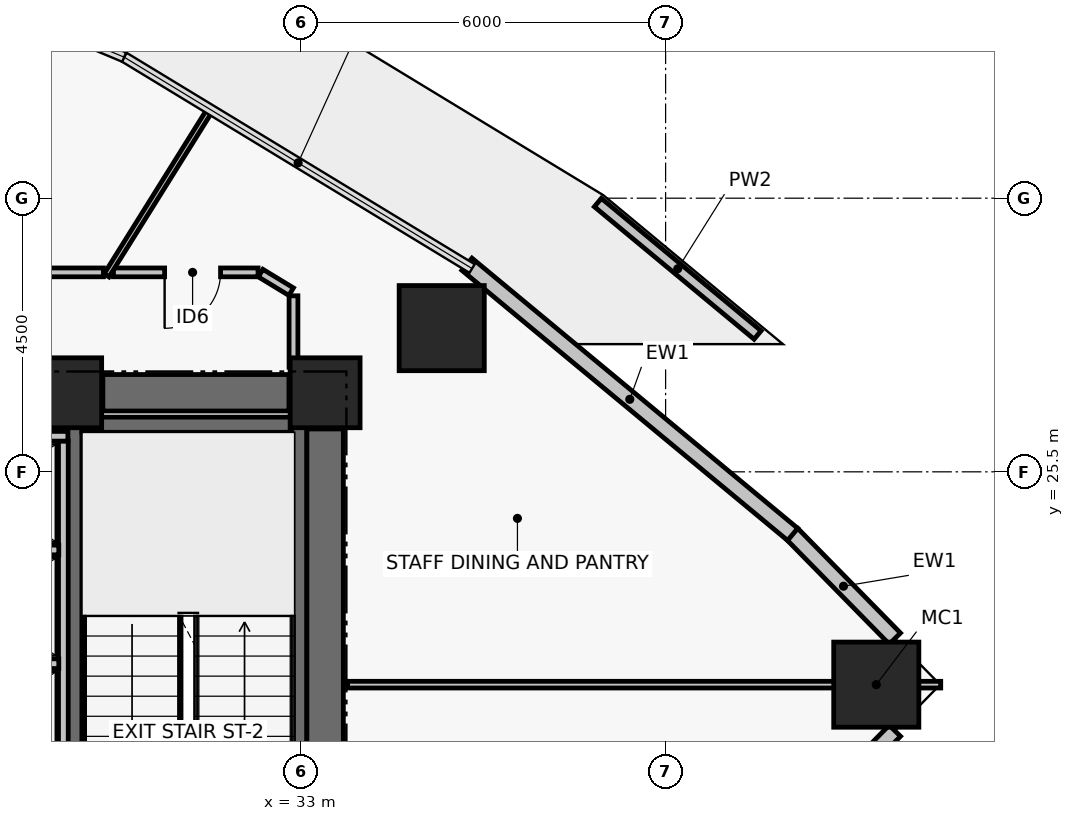
"""IFC4 building model, lengths in metres.
Left out: names, types, materials, properties, quantities, classifications, styles, units other than length and angle.
Written with IfcOpenShell. Run it as: python <this file> out.ifc"""

import sys

from ifc_helpers import new_model, si_unit, direction, frame, frame_2d, origin, origin_2d, place, context, subcontext, project, spatial, rectangle, hollow_rectangle, extrude, element, fill, save


model = new_model("IFC4")
c1 = context("Model", 3, precision=1e-05, world=origin(), true_north=direction((0.0, 1.0)))
c2 = subcontext(c1, "Body", "Model", "MODEL_VIEW")
j1 = project(units=[si_unit("LENGTHUNIT", "METRE"), si_unit("PLANEANGLEUNIT", "RADIAN")], contexts=[c1])
p1 = place(None, origin())
s1 = spatial("IfcSite", under=j1, at=p1, CompositionType="ELEMENT")
p2 = place(p1, origin())
s2 = spatial("IfcBuilding", under=s1, at=p2, CompositionType="ELEMENT")
p3 = place(p2, frame((0.0, 0.0, 27.6)))
s3 = spatial("IfcBuildingStorey", under=s2, at=p3, CompositionType="ELEMENT", Elevation=27.6)
for number, where, z_axis, x_axis in (
    (1, (29.15, 26.8, 0.0), (0.0, 0.0, 1.0), (1.0, 0.0, 0.0)),
    (2, (33.4, 26.8, 0.0), (0.0, 0.0, 1.0), (1.0, 0.0, 0.0)),
):
    element("IfcColumn", number, at=place(p3, frame(where, z_axis=z_axis, x_axis=x_axis)), inside=s3, PredefinedType="COLUMN", context=c2, shape_type="SweptSolid", body=[
        extrude(rectangle(XDim=1.15, YDim=1.15, at=origin_2d()), origin(), (0.0, 0.0, 1.0), 3.72),
    ])
p4 = place(p3, frame((29.745, 26.8, 0.0), z_axis=(0.0, 0.0, 1.0), x_axis=(1.0, 0.0, 0.0)))
e3 = element("IfcWall", 3, at=p4, inside=s3, PredefinedType="SHEAR", context=c2, shape_type="SweptSolid", body=[
    extrude(rectangle(XDim=3.06, YDim=0.6, at=frame_2d((1.53, 0.0))), origin(), (0.0, 0.0, 1.0), 3.47),
])
p5 = place(p3, frame((33.4, 17.795, 0.0), z_axis=(0.0, 0.0, 1.0), x_axis=(0.0, 1.0, 0.0)))
e4 = element("IfcWall", 4, at=p5, inside=s3, PredefinedType="SHEAR", context=c2, shape_type="SweptSolid", body=[
    extrude(rectangle(XDim=8.41, YDim=0.6, at=frame_2d((4.205, 0.0))), origin(), (0.0, 0.0, 1.0), 3.47),
])
p6 = place(p3, frame((29.275, 17.6, 0.0), z_axis=(0.0, 0.0, 1.0), x_axis=(0.0, 1.0, 0.0)))
e5 = element("IfcWall", 5, at=p6, inside=s3, PredefinedType="SHEAR", context=c2, shape_type="SweptSolid", body=[
    extrude(rectangle(XDim=8.8, YDim=0.25, at=frame_2d((4.4, 0.0))), origin(), (0.0, 0.0, 1.0), 3.47),
])
p7 = place(p6, frame((0.35, 0.0, 0.0)))
e6 = element("IfcOpeningElement", 6, at=p7, cuts=e5, PredefinedType="OPENING", context=c2, shape_type="SweptSolid", body=[
    extrude(rectangle(XDim=1.05, YDim=2.08, at=frame_2d((0.525, 1.04))), frame((0.0, 0.135, 0.0), z_axis=(0.0, -1.0, 0.0), x_axis=(1.0, 0.0, 0.0)), (0.0, 0.0, 1.0), 0.27),
])
p8 = place(p3, frame((32.971, 17.6, 0.0), z_axis=(0.0, 0.0, 1.0), x_axis=(0.0, 1.0, 0.0)))
e7 = element("IfcWall", 7, at=p8, inside=s3, PredefinedType="SHEAR", context=c2, shape_type="SweptSolid", body=[
    extrude(rectangle(XDim=8.8, YDim=0.25, at=frame_2d((4.4, 0.0))), origin(), (0.0, 0.0, 1.0), 3.47),
])
p9 = place(p3, frame((29.4, 26.275, 0.0), z_axis=(0.0, 0.0, 1.0), x_axis=(1.0, 0.0, 0.0)))
e8 = element("IfcWall", 8, at=p9, inside=s3, PredefinedType="SHEAR", context=c2, shape_type="SweptSolid", body=[
    extrude(rectangle(XDim=3.446, YDim=0.25, at=frame_2d((1.723, 0.0))), origin(), (0.0, 0.0, 1.0), 3.47),
])
for number, where, z_axis, x_axis in (
    (9, (42.465, 22.0, 0.0), (0.0, 0.0, 1.0), (1.0, 0.0, 0.0)),
    (10, (35.318, 27.863, 0.0), (0.0, 0.0, 1.0), (1.0, 0.0, 0.0)),
):
    element("IfcColumn", number, at=place(p3, frame(where, z_axis=z_axis, x_axis=x_axis)), inside=s3, PredefinedType="COLUMN", context=c2, shape_type="SweptSolid", body=[
        extrude(hollow_rectangle(XDim=1.4, YDim=1.4, WallThickness=0.055, at=origin_2d()), origin(), (0.0, 0.0, 1.0), 3.72),
    ])
for number, where, z_axis, x_axis in (
    (11, (42.77, 21.242, 0.0), (0.0, 0.0, 1.0), (-0.701, -0.714, 0.0)),
    (12, (41.081, 24.479, 0.0), (0.0, 0.0, 1.0), (0.701, -0.714, 0.0)),
):
    element("IfcWall", number, at=place(p3, frame(where, z_axis=z_axis, x_axis=x_axis)), inside=s3, PredefinedType="PARTITIONING", context=c2, shape_type="SweptSolid", body=[
        extrude(rectangle(XDim=2.412, YDim=0.26, at=frame_2d((1.206, 0.0))), origin(), (0.0, 0.0, 1.0), 3.47),
    ])
p10 = place(p3, frame((35.732, 28.914, 0.0), z_axis=(0.0, 0.0, 1.0), x_axis=(0.769754596928, -0.638339925517, 0.0)))
e13 = element("IfcWall", 13, at=p10, inside=s3, PredefinedType="PARTITIONING", context=c2, shape_type="SweptSolid", body=[
    extrude(rectangle(XDim=6.959, YDim=0.26, at=frame_2d((3.479, 0.0))), origin(), (0.0, 0.0, 1.0), 3.47),
])
p11 = place(p3, frame((37.886, 29.929, 0.0), z_axis=(0.0, 0.0, 1.0), x_axis=(0.769720237207, -0.638381356584, 0.0)))
e14 = element("IfcWall", 14, at=p11, inside=s3, PredefinedType="PARAPET", context=c2, shape_type="SweptSolid", body=[
    extrude(rectangle(XDim=3.413, YDim=0.18, at=frame_2d((1.707, 0.0))), origin(), (0.0, 0.0, 1.0), 1.15),
])
p12 = place(p3, frame((29.095, 20.56, 0.0), z_axis=(0.0, 0.0, 1.0), x_axis=(0.0, 1.0, 0.0)))
e15 = element("IfcWall", 15, at=p12, inside=s3, PredefinedType="PARTITIONING", context=c2, shape_type="SweptSolid", body=[
    extrude(rectangle(XDim=5.45, YDim=0.16, at=frame_2d((2.725, 0.0))), origin(), (0.0, 0.0, 1.0), 3.47),
])
p13 = place(p3, frame((26.37, 22.345, 0.0), z_axis=(0.0, 0.0, 1.0), x_axis=(1.0, 0.0, 0.0)))
e16 = element("IfcWall", 16, at=p13, inside=s3, PredefinedType="PARTITIONING", context=c2, shape_type="SweptSolid", body=[
    extrude(rectangle(XDim=2.65, YDim=0.16, at=frame_2d((1.325, 0.0))), origin(), (0.0, 0.0, 1.0), 3.47),
])
p14 = place(p3, frame((26.53, 24.215, 0.0), z_axis=(0.0, 0.0, 1.0), x_axis=(1.0, 0.0, 0.0)))
e17 = element("IfcWall", 17, at=p14, inside=s3, PredefinedType="PARTITIONING", context=c2, shape_type="SweptSolid", body=[
    extrude(rectangle(XDim=2.49, YDim=0.16, at=frame_2d((1.245, 0.0))), origin(), (0.0, 0.0, 1.0), 3.47),
])
p15 = place(p3, frame((26.34, 26.085, 0.0), z_axis=(0.0, 0.0, 1.0), x_axis=(1.0, 0.0, 0.0)))
e18 = element("IfcWall", 18, at=p15, inside=s3, PredefinedType="PARTITIONING", context=c2, shape_type="SweptSolid", body=[
    extrude(rectangle(XDim=2.83, YDim=0.16, at=frame_2d((1.415, 0.0))), origin(), (0.0, 0.0, 1.0), 3.47),
])
p16 = place(p3, frame((33.74, 27.22, 0.0), z_axis=(0.0, 0.0, 1.0), x_axis=(-1.0, 0.0, 0.0)))
e19 = element("IfcWall", 19, at=p16, inside=s3, PredefinedType="PARTITIONING", context=c2, shape_type="SweptSolid", body=[
    extrude(rectangle(XDim=0.86, YDim=0.145, at=frame_2d((0.43, 0.0))), origin(), (0.0, 0.0, 1.0), 2.6),
])
p17 = place(p3, frame((32.88, 27.22, 0.0), z_axis=(0.0, 0.0, 1.0), x_axis=(0.0, 1.0, 0.0)))
e20 = element("IfcWall", 20, at=p17, inside=s3, PredefinedType="PARTITIONING", context=c2, shape_type="SweptSolid", body=[
    extrude(rectangle(XDim=1.175, YDim=0.145, at=frame_2d((0.587, 0.0))), origin(), (0.0, 0.0, 1.0), 2.6),
])
p18 = place(p3, frame((32.842, 28.463, 0.0), z_axis=(0.0, 0.0, 1.0), x_axis=(-0.854807247113, 0.518945633264, 0.0)))
e21 = element("IfcWall", 21, at=p18, inside=s3, PredefinedType="PARTITIONING", context=c2, shape_type="SweptSolid", body=[
    extrude(rectangle(XDim=0.588, YDim=0.145, at=frame_2d((0.294, 0.0))), origin(), (0.0, 0.0, 1.0), 3.0),
])
p19 = place(p3, frame((32.297, 28.78, 0.0), z_axis=(0.0, 0.0, 1.0), x_axis=(-1.0, 0.0, 0.0)))
e22 = element("IfcWall", 22, at=p19, inside=s3, PredefinedType="PARTITIONING", context=c2, shape_type="SweptSolid", body=[
    extrude(rectangle(XDim=2.378, YDim=0.145, at=frame_2d((1.189, 0.0))), origin(), (0.0, 0.0, 1.0), 3.0),
])
p20 = place(p19, frame((0.617, 0.0, 0.0)))
e23 = element("IfcOpeningElement", 23, at=p20, cuts=e22, PredefinedType="OPENING", context=c2, shape_type="SweptSolid", body=[
    extrude(rectangle(XDim=0.92, YDim=2.05, at=frame_2d((0.46, 1.025))), frame((0.0, 0.083, 0.0), z_axis=(0.0, -1.0, 0.0), x_axis=(1.0, 0.0, 0.0)), (0.0, 0.0, 1.0), 0.165),
])
p21 = place(p3, frame((29.754, 28.78, 0.0), z_axis=(0.0, 0.0, 1.0), x_axis=(-1.0, 0.0, 0.0)))
e24 = element("IfcWall", 24, at=p21, inside=s3, PredefinedType="PARTITIONING", context=c2, shape_type="SweptSolid", body=[
    extrude(rectangle(XDim=7.68, YDim=0.145, at=frame_2d((3.84, 0.0))), origin(), (0.0, 0.0, 1.0), 2.6),
])
p22 = place(p21, frame((3.365, 0.0, 0.0)))
e25 = element("IfcOpeningElement", 25, at=p22, cuts=e24, PredefinedType="OPENING", context=c2, shape_type="SweptSolid", body=[
    extrude(rectangle(XDim=0.95, YDim=2.06, at=frame_2d((0.475, 1.03))), frame((0.0, 0.083, 0.0), z_axis=(0.0, -1.0, 0.0), x_axis=(1.0, 0.0, 0.0)), (0.0, 0.0, 1.0), 0.165),
])
p23 = place(p3, frame((33.77, 22.0, 0.0), z_axis=(0.0, 0.0, 1.0), x_axis=(1.0, 0.0, 0.0)))
e26 = element("IfcWall", 26, at=p23, inside=s3, PredefinedType="PARTITIONING", context=c2, shape_type="SweptSolid", body=[
    extrude(rectangle(XDim=9.755, YDim=0.11, at=frame_2d((4.877, 0.0))), origin(), (0.0, 0.0, 1.0), 2.6),
])
p24 = place(p3, frame((29.805, 28.73, 0.0), z_axis=(0.0, 0.0, 1.0), x_axis=(0.529903768235, 0.848057778934, 0.0)))
e27 = element("IfcWall", 27, at=p24, inside=s3, PredefinedType="PARTITIONING", context=c2, shape_type="SweptSolid", body=[
    extrude(rectangle(XDim=3.228, YDim=0.095, at=frame_2d((1.614, 0.0))), origin(), (0.0, 0.0, 1.0), 2.85),
])
p25 = place(p20, origin())
e28 = element("IfcDoor", 28, at=p25, inside=s3, OperationType="SINGLE_SWING_RIGHT", PredefinedType="DOOR", context=c2, shape_type="SweptSolid", body=[
    extrude(rectangle(XDim=0.92, YDim=2.05, at=frame_2d((0.46, 1.025))), frame((0.0, 0.025, 0.0), z_axis=(0.0, -1.0, 0.0), x_axis=(1.0, 0.0, 0.0)), (0.0, 0.0, 1.0), 0.05),
])
fill(e23, e28)
save(model, sys.argv[1])
